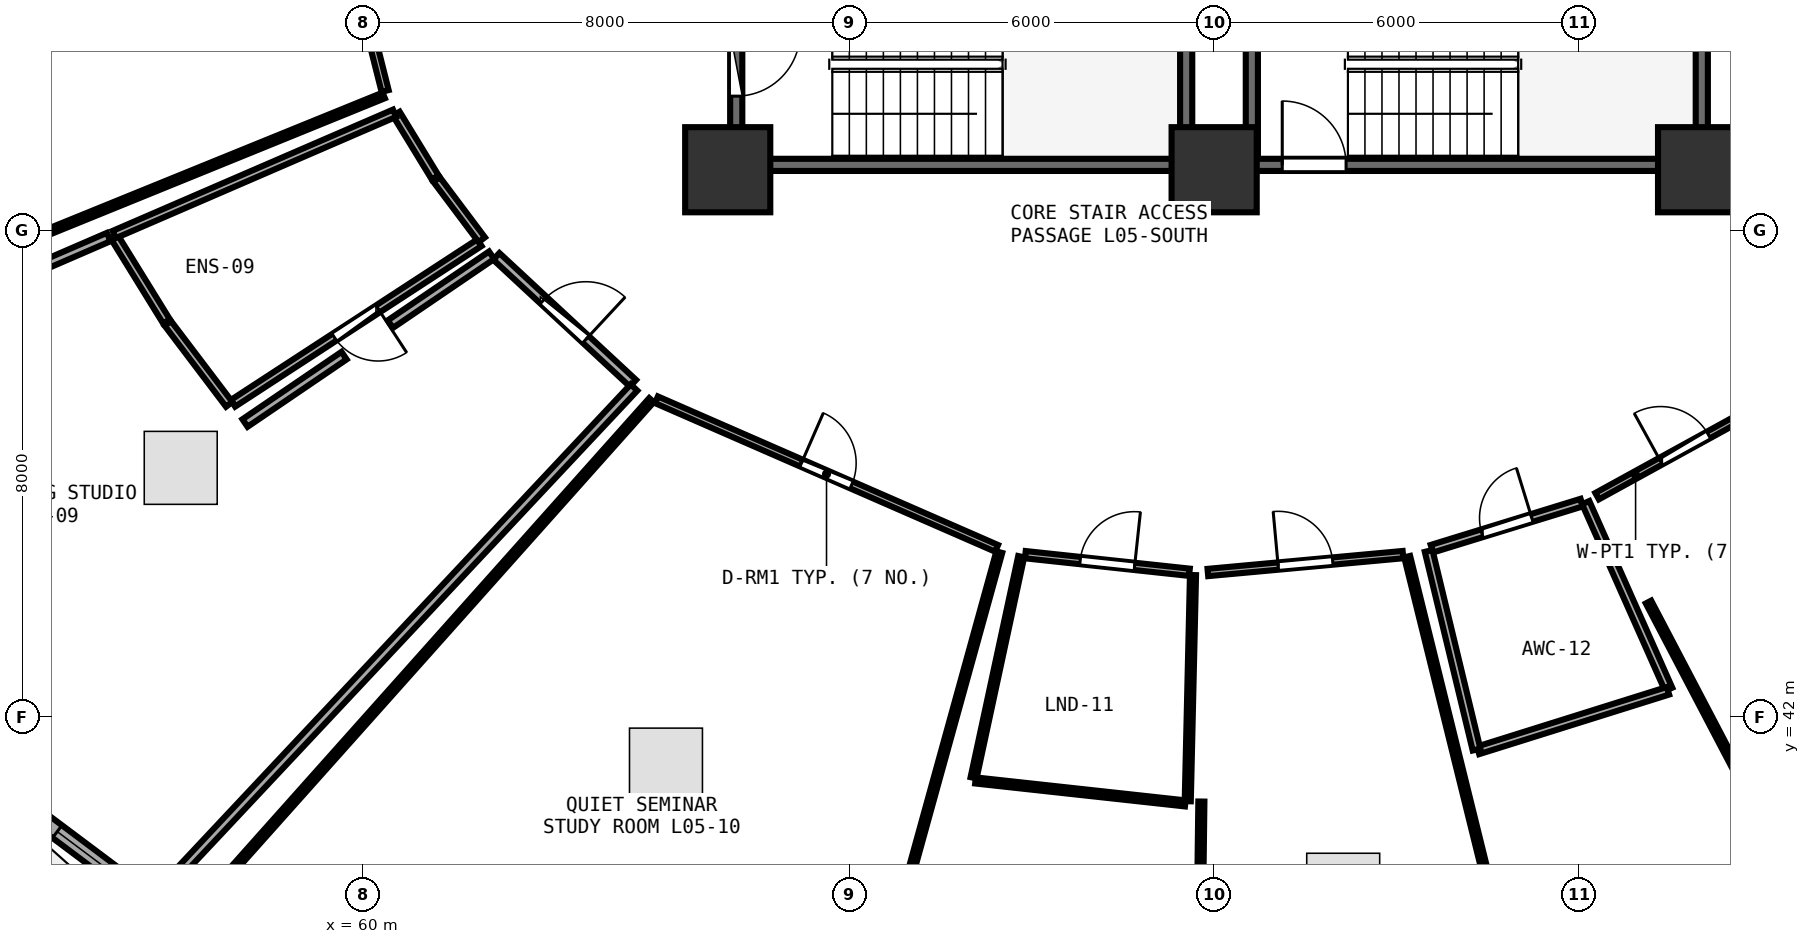
"""IFC4 building model, lengths in metres.
Left out: names, types, materials, properties, quantities, classifications, styles, units other than length and angle.
Written with IfcOpenShell. Run it as: python <this file> out.ifc"""

import sys

from ifc_helpers import new_model, si_unit, direction, frame, frame_2d, origin, origin_2d, place, context, subcontext, project, spatial, rectangle, extrude, element, fill, save


model = new_model("IFC4")
c1 = context("Model", 3, precision=1e-05, world=origin(), true_north=direction((0.0, 1.0)))
c2 = subcontext(c1, "Body", "Model", "MODEL_VIEW")
j1 = project(units=[si_unit("LENGTHUNIT", "METRE"), si_unit("PLANEANGLEUNIT", "RADIAN")], contexts=[c1])
p1 = place(None, origin())
s1 = spatial("IfcSite", under=j1, at=p1, CompositionType="ELEMENT")
p2 = place(p1, origin())
s2 = spatial("IfcBuilding", under=s1, at=p2, CompositionType="ELEMENT")
p3 = place(p2, frame((0.0, 0.0, 22.5)))
s3 = spatial("IfcBuildingStorey", under=s2, at=p3, CompositionType="ELEMENT", Elevation=22.5)
for number, where, z_axis, x_axis in (
    (1, (66.0, 51.0, 0.0), (0.0, 0.0, 1.0), (1.0, 0.0, 0.0)),
    (2, (74.0, 51.0, 0.0), (0.0, 0.0, 1.0), (1.0, 0.0, 0.0)),
    (3, (82.0, 51.0, 0.0), (0.0, 0.0, 1.0), (1.0, 0.0, 0.0)),
):
    element("IfcColumn", number, at=place(p3, frame(where, z_axis=z_axis, x_axis=x_axis)), inside=s3, PredefinedType="PILASTER", context=c2, shape_type="SweptSolid", body=[
        extrude(rectangle(XDim=1.4, YDim=1.4, at=origin_2d()), origin(), (0.0, 0.0, 1.0), 3.75),
    ])
p4 = place(p3, frame((53.016, 41.582, 0.0), z_axis=(0.0, 0.0, 1.0), x_axis=(0.80030733173, -0.599590005569, 0.0)))
e4 = element("IfcWall", 4, at=p4, inside=s3, PredefinedType="SOLIDWALL", context=c2, shape_type="SweptSolid", body=[
    extrude(rectangle(XDim=8.291, YDim=0.26, at=frame_2d((4.145, 0.0))), origin(), (0.0, 0.0, 1.0), 3.475),
])
p5 = place(p4, frame((2.445, 0.0, 0.85)))
e5 = element("IfcOpeningElement", 5, at=p5, cuts=e4, PredefinedType="OPENING", context=c2, shape_type="SweptSolid", body=[
    extrude(rectangle(XDim=1.6, YDim=1.45, at=frame_2d((0.8, 0.725))), frame((0.0, 0.14, 0.0), z_axis=(0.0, -1.0, 0.0), x_axis=(1.0, 0.0, 0.0)), (0.0, 0.0, 1.0), 0.28),
])
p6 = place(p3, frame((74.0, 51.08, 0.0), z_axis=(0.0, 0.0, 1.0), x_axis=(1.0, 0.0, 0.0)))
e6 = element("IfcWall", 6, at=p6, inside=s3, PredefinedType="SHEAR", context=c2, shape_type="SweptSolid", body=[
    extrude(rectangle(XDim=7.9, YDim=0.2, at=frame_2d((3.95, 0.0))), origin(), (0.0, 0.0, 1.0), 3.49),
])
p7 = place(p6, frame((1.12, 0.0, 0.0)))
e7 = element("IfcOpeningElement", 7, at=p7, cuts=e6, PredefinedType="OPENING", context=c2, shape_type="SweptSolid", body=[
    extrude(rectangle(XDim=1.05, YDim=2.1, at=frame_2d((0.525, 1.05))), frame((0.0, 0.11, 0.0), z_axis=(0.0, -1.0, 0.0), x_axis=(1.0, 0.0, 0.0)), (0.0, 0.0, 1.0), 0.22),
])
for number, where, z_axis, x_axis in (
    (8, (82.02, 51.2, 0.0), (0.0, 0.0, 1.0), (0.0, 1.0, 0.0)),
    (9, (74.62, 54.27, 0.0), (0.0, 0.0, 1.0), (0.0, -1.0, 0.0)),
):
    element("IfcWall", number, at=place(p3, frame(where, z_axis=z_axis, x_axis=x_axis)), inside=s3, PredefinedType="SHEAR", context=c2, shape_type="SweptSolid", body=[
        extrude(rectangle(XDim=3.07, YDim=0.2, at=frame_2d((1.535, 0.0))), origin(), (0.0, 0.0, 1.0), 3.49),
    ])
p8 = place(p3, frame((66.26, 51.08, 0.0), z_axis=(0.0, 0.0, 1.0), x_axis=(1.0, 0.0, 0.0)))
e10 = element("IfcWall", 10, at=p8, inside=s3, PredefinedType="SHEAR", context=c2, shape_type="SweptSolid", body=[
    extrude(rectangle(XDim=7.16, YDim=0.2, at=frame_2d((3.58, 0.0))), origin(), (0.0, 0.0, 1.0), 3.49),
])
p9 = place(p3, frame((73.54, 51.2, 0.0), z_axis=(0.0, 0.0, 1.0), x_axis=(0.0, 1.0, 0.0)))
e11 = element("IfcWall", 11, at=p9, inside=s3, PredefinedType="SHEAR", context=c2, shape_type="SweptSolid", body=[
    extrude(rectangle(XDim=3.07, YDim=0.2, at=frame_2d((1.535, 0.0))), origin(), (0.0, 0.0, 1.0), 3.49),
])
p10 = place(p3, frame((66.14, 54.27, 0.0), z_axis=(0.0, 0.0, 1.0), x_axis=(0.0, -1.0, 0.0)))
e12 = element("IfcWall", 12, at=p10, inside=s3, PredefinedType="SHEAR", context=c2, shape_type="SweptSolid", body=[
    extrude(rectangle(XDim=3.07, YDim=0.2, at=frame_2d((1.535, 0.0))), origin(), (0.0, 0.0, 1.0), 3.49),
])
p11 = place(p10, frame((1.01, 0.0, 0.0)))
e13 = element("IfcOpeningElement", 13, at=p11, cuts=e12, PredefinedType="OPENING", context=c2, shape_type="SweptSolid", body=[
    extrude(rectangle(XDim=1.05, YDim=2.1, at=frame_2d((0.525, 1.05))), frame((0.0, 0.11, 0.0), z_axis=(0.0, -1.0, 0.0), x_axis=(1.0, 0.0, 0.0)), (0.0, 0.0, 1.0), 0.22),
])
p12 = place(p3, frame((58.986, 57.775, 0.0), z_axis=(0.0, 0.0, 1.0), x_axis=(0.244192294026, -0.969726829338, 0.0)))
e14 = element("IfcWall", 14, at=p12, inside=s3, PredefinedType="PARTITIONING", context=c2, shape_type="SweptSolid", body=[
    extrude(rectangle(XDim=5.651, YDim=0.12, at=frame_2d((2.825, 0.0))), origin(), (0.0, 0.0, 1.0), 3.48),
])
p13 = place(p12, frame((2.375, 0.0, 0.0)))
e15 = element("IfcOpeningElement", 15, at=p13, cuts=e14, PredefinedType="OPENING", context=c2, shape_type="SweptSolid", body=[
    extrude(rectangle(XDim=0.9, YDim=2.08, at=frame_2d((0.45, 1.04))), frame((0.0, 0.07, 0.0), z_axis=(0.0, -1.0, 0.0), x_axis=(1.0, 0.0, 0.0)), (0.0, 0.0, 1.0), 0.14),
])
p14 = place(p3, frame((61.917, 49.8, 0.0), z_axis=(0.0, 0.0, 1.0), x_axis=(-0.837796261941, -0.545982988267, 0.0)))
e16 = element("IfcWall", 16, at=p14, inside=s3, PredefinedType="PLUMBINGWALL", context=c2, shape_type="SweptSolid", body=[
    extrude(rectangle(XDim=4.838, YDim=0.13, at=frame_2d((2.419, 0.0))), origin(), (0.0, 0.0, 1.0), 3.235),
])
p15 = place(p14, frame((1.989, 0.0, 0.0)))
e17 = element("IfcOpeningElement", 17, at=p15, cuts=e16, PredefinedType="OPENING", context=c2, shape_type="SweptSolid", body=[
    extrude(rectangle(XDim=0.86, YDim=2.05, at=frame_2d((0.43, 1.025))), frame((0.0, 0.075, 0.0), z_axis=(0.0, -1.0, 0.0), x_axis=(1.0, 0.0, 0.0)), (0.0, 0.0, 1.0), 0.15),
])
p16 = place(p3, frame((62.194, 49.575, 0.0), z_axis=(0.0, 0.0, 1.0), x_axis=(0.7329267348, -0.680307578538, 0.0)))
e18 = element("IfcWall", 18, at=p16, inside=s3, PredefinedType="PARTITIONING", context=c2, shape_type="SweptSolid", body=[
    extrude(rectangle(XDim=3.067, YDim=0.15, at=frame_2d((1.533, 0.0))), origin(), (0.0, 0.0, 1.0), 2.875),
])
p17 = place(p16, frame((1.059, 0.0, 0.0)))
e19 = element("IfcOpeningElement", 19, at=p17, cuts=e18, PredefinedType="OPENING", context=c2, shape_type="SweptSolid", body=[
    extrude(rectangle(XDim=0.95, YDim=2.08, at=frame_2d((0.475, 1.04))), frame((0.0, 0.085, 0.0), z_axis=(0.0, -1.0, 0.0), x_axis=(1.0, 0.0, 0.0)), (0.0, 0.0, 1.0), 0.17),
])
p18 = place(p3, frame((64.828, 47.217, 0.0), z_axis=(0.0, 0.0, 1.0), x_axis=(0.916419655578, -0.400218708797, 0.0)))
e20 = element("IfcWall", 20, at=p18, inside=s3, PredefinedType="PARTITIONING", context=c2, shape_type="SweptSolid", body=[
    extrude(rectangle(XDim=6.104, YDim=0.12, at=frame_2d((3.052, 0.0))), origin(), (0.0, 0.0, 1.0), 2.875),
])
p19 = place(p18, frame((2.602, 0.0, 0.0)))
e21 = element("IfcOpeningElement", 21, at=p19, cuts=e20, PredefinedType="OPENING", context=c2, shape_type="SweptSolid", body=[
    extrude(rectangle(XDim=0.9, YDim=2.08, at=frame_2d((0.45, 1.04))), frame((0.0, 0.07, 0.0), z_axis=(0.0, -1.0, 0.0), x_axis=(1.0, 0.0, 0.0)), (0.0, 0.0, 1.0), 0.14),
])
p20 = place(p3, frame((70.895, 44.67, 0.0), z_axis=(0.0, 0.0, 1.0), x_axis=(0.994302004983, -0.106599825921, 0.0)))
e22 = element("IfcWall", 22, at=p20, inside=s3, PredefinedType="PARTITIONING", context=c2, shape_type="SweptSolid", body=[
    extrude(rectangle(XDim=2.714, YDim=0.12, at=frame_2d((1.357, 0.0))), origin(), (0.0, 0.0, 1.0), 3.235),
])
p21 = place(p20, frame((0.907, 0.0, 0.0)))
e23 = element("IfcOpeningElement", 23, at=p21, cuts=e22, PredefinedType="OPENING", context=c2, shape_type="SweptSolid", body=[
    extrude(rectangle(XDim=0.9, YDim=2.08, at=frame_2d((0.45, 1.04))), frame((0.0, 0.07, 0.0), z_axis=(0.0, -1.0, 0.0), x_axis=(1.0, 0.0, 0.0)), (0.0, 0.0, 1.0), 0.14),
])
p22 = place(p3, frame((73.897, 44.376, 0.0), z_axis=(0.0, 0.0, 1.0), x_axis=(0.995829610124, 0.091232601628, 0.0)))
e24 = element("IfcWall", 24, at=p22, inside=s3, PredefinedType="PARTITIONING", context=c2, shape_type="SweptSolid", body=[
    extrude(rectangle(XDim=3.222, YDim=0.12, at=frame_2d((1.611, 0.0))), origin(), (0.0, 0.0, 1.0), 3.235),
])
p23 = place(p22, frame((1.161, 0.0, 0.0)))
e25 = element("IfcOpeningElement", 25, at=p23, cuts=e24, PredefinedType="OPENING", context=c2, shape_type="SweptSolid", body=[
    extrude(rectangle(XDim=0.9, YDim=2.08, at=frame_2d((0.45, 1.04))), frame((0.0, 0.07, 0.0), z_axis=(0.0, -1.0, 0.0), x_axis=(1.0, 0.0, 0.0)), (0.0, 0.0, 1.0), 0.14),
])
p24 = place(p3, frame((77.58, 44.768, 0.0), z_axis=(0.0, 0.0, 1.0), x_axis=(0.955754448098, 0.294165659011, 0.0)))
e26 = element("IfcWall", 26, at=p24, inside=s3, PredefinedType="PLUMBINGWALL", context=c2, shape_type="SweptSolid", body=[
    extrude(rectangle(XDim=2.579, YDim=0.13, at=frame_2d((1.29, 0.0))), origin(), (0.0, 0.0, 1.0), 3.235),
])
p25 = place(p24, frame((0.86, 0.0, 0.0)))
e27 = element("IfcOpeningElement", 27, at=p25, cuts=e26, PredefinedType="OPENING", context=c2, shape_type="SweptSolid", body=[
    extrude(rectangle(XDim=0.86, YDim=2.05, at=frame_2d((0.43, 1.025))), frame((0.0, 0.075, 0.0), z_axis=(0.0, -1.0, 0.0), x_axis=(1.0, 0.0, 0.0)), (0.0, 0.0, 1.0), 0.15),
])
p26 = place(p3, frame((80.299, 45.632, 0.0), z_axis=(0.0, 0.0, 1.0), x_axis=(0.876387079092, 0.481607399861, 0.0)))
e28 = element("IfcWall", 28, at=p26, inside=s3, PredefinedType="PARTITIONING", context=c2, shape_type="SweptSolid", body=[
    extrude(rectangle(XDim=3.281, YDim=0.12, at=frame_2d((1.641, 0.0))), origin(), (0.0, 0.0, 1.0), 2.875),
])
p27 = place(p26, frame((1.191, 0.0, 0.0)))
e29 = element("IfcOpeningElement", 29, at=p27, cuts=e28, PredefinedType="OPENING", context=c2, shape_type="SweptSolid", body=[
    extrude(rectangle(XDim=0.9, YDim=2.08, at=frame_2d((0.45, 1.04))), frame((0.0, 0.07, 0.0), z_axis=(0.0, -1.0, 0.0), x_axis=(1.0, 0.0, 0.0)), (0.0, 0.0, 1.0), 0.14),
])
p28 = place(p3, frame((60.343, 52.222, 0.0), z_axis=(0.0, 0.0, 1.0), x_axis=(-0.926333713065, -0.376703931542, 0.0)))
e30 = element("IfcWall", 30, at=p28, inside=s3, PredefinedType="PARTITIONING", context=c2, shape_type="SweptSolid", body=[
    extrude(rectangle(XDim=12.099, YDim=0.1, at=frame_2d((6.05, 0.0))), origin(), (0.0, 0.0, 1.0), 2.875),
])
p29 = place(p3, frame((60.549, 51.92, 0.0), z_axis=(0.0, 0.0, 1.0), x_axis=(0.52146609248, -0.853272004928, 0.0)))
e31 = element("IfcWall", 31, at=p29, inside=s3, PredefinedType="PLUMBINGWALL", context=c2, shape_type="SweptSolid", body=[
    extrude(rectangle(XDim=1.228, YDim=0.13, at=frame_2d((0.614, 0.0))), origin(), (0.0, 0.0, 1.0), 3.48),
])
p30 = place(p3, frame((61.212, 50.839, 0.0), z_axis=(0.0, 0.0, 1.0), x_axis=(0.600347056143, -0.79973959023, 0.0)))
e32 = element("IfcWall", 32, at=p30, inside=s3, PredefinedType="PLUMBINGWALL", context=c2, shape_type="SweptSolid", body=[
    extrude(rectangle(XDim=1.238, YDim=0.13, at=frame_2d((0.619, 0.0))), origin(), (0.0, 0.0, 1.0), 2.875),
])
p31 = place(p3, frame((57.801, 47.142, 0.0), z_axis=(0.0, 0.0, 1.0), x_axis=(-0.60376191721, 0.797164692725, 0.0)))
e33 = element("IfcWall", 33, at=p31, inside=s3, PredefinedType="PLUMBINGWALL", context=c2, shape_type="SweptSolid", body=[
    extrude(rectangle(XDim=1.669, YDim=0.13, at=frame_2d((0.834, 0.0))), origin(), (0.0, 0.0, 1.0), 3.175),
])
p32 = place(p3, frame((56.771, 48.505, 0.0), z_axis=(0.0, 0.0, 1.0), x_axis=(-0.525540089642, 0.850768837099, 0.0)))
e34 = element("IfcWall", 34, at=p32, inside=s3, PredefinedType="PLUMBINGWALL", context=c2, shape_type="SweptSolid", body=[
    extrude(rectangle(XDim=1.651, YDim=0.13, at=frame_2d((0.826, 0.0))), origin(), (0.0, 0.0, 1.0), 3.175),
])
p33 = place(p3, frame((55.91, 49.935, 0.0), z_axis=(0.0, 0.0, 1.0), x_axis=(0.917797204715, 0.397049481826, 0.0)))
e35 = element("IfcWall", 35, at=p33, inside=s3, PredefinedType="PLUMBINGWALL", context=c2, shape_type="SweptSolid", body=[
    extrude(rectangle(XDim=5.023, YDim=0.13, at=frame_2d((2.511, 0.0))), origin(), (0.0, 0.0, 1.0), 2.875),
])
p34 = place(p3, frame((64.458, 47.419, 0.0), z_axis=(0.0, 0.0, 1.0), x_axis=(-0.684261294523, -0.729236916796, 0.0)))
e36 = element("IfcWall", 36, at=p34, inside=s3, PredefinedType="PARTITIONING", context=c2, shape_type="SweptSolid", body=[
    extrude(rectangle(XDim=11.438, YDim=0.15, at=frame_2d((5.719, 0.0))), origin(), (0.0, 0.0, 1.0), 2.875),
])
p35 = place(p3, frame((49.426, 47.126, 0.0), z_axis=(0.0, 0.0, 1.0), x_axis=(0.917736225937, 0.397190407239, 0.0)))
e37 = element("IfcWall", 37, at=p35, inside=s3, PredefinedType="PARTITIONING", context=c2, shape_type="SweptSolid", body=[
    extrude(rectangle(XDim=6.967, YDim=0.15, at=frame_2d((3.483, 0.0))), origin(), (0.0, 0.0, 1.0), 2.875),
])
p36 = place(p3, frame((58.061, 46.834, 0.0), z_axis=(0.0, 0.0, 1.0), x_axis=(0.826811291248, 0.562479411769, 0.0)))
e38 = element("IfcWall", 38, at=p36, inside=s3, PredefinedType="PARTITIONING", context=c2, shape_type="SweptSolid", body=[
    extrude(rectangle(XDim=1.971, YDim=0.15, at=frame_2d((0.985, 0.0))), origin(), (0.0, 0.0, 1.0), 3.48),
])
p37 = place(p3, frame((60.451, 48.461, 0.0), z_axis=(0.0, 0.0, 1.0), x_axis=(0.826867883695, 0.562396215237, 0.0)))
e39 = element("IfcWall", 39, at=p37, inside=s3, PredefinedType="PARTITIONING", context=c2, shape_type="SweptSolid", body=[
    extrude(rectangle(XDim=2.014, YDim=0.15, at=frame_2d((1.007, 0.0))), origin(), (0.0, 0.0, 1.0), 3.235),
])
p38 = place(p3, frame((70.466, 44.711, 0.0), z_axis=(0.0, 0.0, 1.0), x_axis=(-0.26671307518, -0.963775977875, 0.0)))
e40 = element("IfcWall", 40, at=p38, inside=s3, PredefinedType="PARTITIONING", context=c2, shape_type="SweptSolid", body=[
    extrude(rectangle(XDim=10.865, YDim=0.1, at=frame_2d((5.432, 0.0))), origin(), (0.0, 0.0, 1.0), 2.875),
])
p39 = place(p3, frame((57.156, 38.706, 0.0), z_axis=(0.0, 0.0, 1.0), x_axis=(0.66580890104, 0.746122313897, 0.0)))
e41 = element("IfcWall", 41, at=p39, inside=s3, PredefinedType="PARTITIONING", context=c2, shape_type="SweptSolid", body=[
    extrude(rectangle(XDim=11.399, YDim=0.1, at=frame_2d((5.7, 0.0))), origin(), (0.0, 0.0, 1.0), 2.875),
])
p40 = place(p3, frame((73.652, 44.334, 0.0), z_axis=(0.0, 0.0, 1.0), x_axis=(-0.02316715399, -0.99973160547, 0.0)))
e42 = element("IfcWall", 42, at=p40, inside=s3, PredefinedType="PARTITIONING", context=c2, shape_type="SweptSolid", body=[
    extrude(rectangle(XDim=3.72, YDim=0.1, at=frame_2d((1.86, 0.0))), origin(), (0.0, 0.0, 1.0), 3.175),
])
p41 = place(p3, frame((73.525, 40.579, 0.0), z_axis=(0.0, 0.0, 1.0), x_axis=(-0.994070147468, 0.108740709544, 0.0)))
e43 = element("IfcWall", 43, at=p41, inside=s3, PredefinedType="PARTITIONING", context=c2, shape_type="SweptSolid", body=[
    extrude(rectangle(XDim=3.471, YDim=0.1, at=frame_2d((1.735, 0.0))), origin(), (0.0, 0.0, 1.0), 3.175),
])
p42 = place(p3, frame((70.043, 41.0, 0.0), z_axis=(0.0, 0.0, 1.0), x_axis=(0.210519412271, 0.977589677246, 0.0)))
e44 = element("IfcWall", 44, at=p42, inside=s3, PredefinedType="PARTITIONING", context=c2, shape_type="SweptSolid", body=[
    extrude(rectangle(XDim=3.72, YDim=0.1, at=frame_2d((1.86, 0.0))), origin(), (0.0, 0.0, 1.0), 3.175),
])
p43 = place(p3, frame((77.175, 44.637, 0.0), z_axis=(0.0, 0.0, 1.0), x_axis=(0.239971369295, -0.970779965759, 0.0)))
e45 = element("IfcWall", 45, at=p43, inside=s3, PredefinedType="PARTITIONING", context=c2, shape_type="SweptSolid", body=[
    extrude(rectangle(XDim=10.846, YDim=0.1, at=frame_2d((5.423, 0.0))), origin(), (0.0, 0.0, 1.0), 2.875),
])
p44 = place(p3, frame((73.701, 33.561, 0.0), z_axis=(0.0, 0.0, 1.0), x_axis=(0.012537113793, 0.9999214073, 0.0)))
e46 = element("IfcWall", 46, at=p44, inside=s3, PredefinedType="PARTITIONING", context=c2, shape_type="SweptSolid", body=[
    extrude(rectangle(XDim=7.049, YDim=0.1, at=frame_2d((3.525, 0.0))), origin(), (0.0, 0.0, 1.0), 2.875),
])
p45 = place(p3, frame((80.111, 45.526, 0.0), z_axis=(0.0, 0.0, 1.0), x_axis=(0.405936178007, -0.913901427608, 0.0)))
e47 = element("IfcWall", 47, at=p45, inside=s3, PredefinedType="PLUMBINGWALL", context=c2, shape_type="SweptSolid", body=[
    extrude(rectangle(XDim=3.36, YDim=0.13, at=frame_2d((1.68, 0.0))), origin(), (0.0, 0.0, 1.0), 2.875),
])
p46 = place(p3, frame((81.464, 42.431, 0.0), z_axis=(0.0, 0.0, 1.0), x_axis=(-0.954175708416, -0.299246917226, 0.0)))
e48 = element("IfcWall", 48, at=p46, inside=s3, PredefinedType="PLUMBINGWALL", context=c2, shape_type="SweptSolid", body=[
    extrude(rectangle(XDim=3.275, YDim=0.13, at=frame_2d((1.637, 0.0))), origin(), (0.0, 0.0, 1.0), 2.875),
])
p47 = place(p3, frame((78.315, 41.464, 0.0), z_axis=(0.0, 0.0, 1.0), x_axis=(-0.234406131581, 0.972138758345, 0.0)))
e49 = element("IfcWall", 49, at=p47, inside=s3, PredefinedType="PLUMBINGWALL", context=c2, shape_type="SweptSolid", body=[
    extrude(rectangle(XDim=3.36, YDim=0.13, at=frame_2d((1.68, 0.0))), origin(), (0.0, 0.0, 1.0), 3.235),
])
p48 = place(p3, frame((85.401, 35.769, 0.0), z_axis=(0.0, 0.0, 1.0), x_axis=(-0.464308397246, 0.885673592384, 0.0)))
e50 = element("IfcWall", 50, at=p48, inside=s3, PredefinedType="PARTITIONING", context=c2, shape_type="SweptSolid", body=[
    extrude(rectangle(XDim=9.17, YDim=0.1, at=frame_2d((4.585, 0.0))), origin(), (0.0, 0.0, 1.0), 2.875),
])
p49 = place(p5, origin())
e51 = element("IfcWindow", 51, at=p49, inside=s3, PartitioningType="SINGLE_PANEL", PredefinedType="WINDOW", context=c2, shape_type="SweptSolid", body=[
    extrude(rectangle(XDim=1.6, YDim=1.45, at=frame_2d((0.8, 0.725))), frame((0.0, 0.03, 0.0), z_axis=(0.0, -1.0, 0.0), x_axis=(1.0, 0.0, 0.0)), (0.0, 0.0, 1.0), 0.06),
])
fill(e5, e51)
p50 = place(p7, origin())
e52 = element("IfcDoor", 52, at=p50, inside=s3, OperationType="SINGLE_SWING_LEFT", PredefinedType="DOOR", context=c2, shape_type="SweptSolid", body=[
    extrude(rectangle(XDim=1.05, YDim=2.1, at=frame_2d((0.525, 1.05))), frame((0.0, 0.025, 0.0), z_axis=(0.0, -1.0, 0.0), x_axis=(1.0, 0.0, 0.0)), (0.0, 0.0, 1.0), 0.05),
])
fill(e7, e52)
p51 = place(p11, origin())
e53 = element("IfcDoor", 53, at=p51, inside=s3, OperationType="SINGLE_SWING_LEFT", PredefinedType="DOOR", context=c2, shape_type="SweptSolid", body=[
    extrude(rectangle(XDim=1.05, YDim=2.1, at=frame_2d((0.525, 1.05))), frame((0.0, 0.025, 0.0), z_axis=(0.0, -1.0, 0.0), x_axis=(1.0, 0.0, 0.0)), (0.0, 0.0, 1.0), 0.05),
])
fill(e13, e53)
p52 = place(p15, origin())
e54 = element("IfcDoor", 54, at=p52, inside=s3, OperationType="SINGLE_SWING_LEFT", PredefinedType="DOOR", context=c2, shape_type="SweptSolid", body=[
    extrude(rectangle(XDim=0.86, YDim=2.05, at=frame_2d((0.43, 1.025))), frame((0.0, 0.025, 0.0), z_axis=(0.0, -1.0, 0.0), x_axis=(1.0, 0.0, 0.0)), (0.0, 0.0, 1.0), 0.05),
])
fill(e17, e54)
p53 = place(p17, origin())
e55 = element("IfcDoor", 55, at=p53, inside=s3, OperationType="SINGLE_SWING_RIGHT", PredefinedType="DOOR", context=c2, shape_type="SweptSolid", body=[
    extrude(rectangle(XDim=0.95, YDim=2.08, at=frame_2d((0.475, 1.04))), frame((0.0, 0.025, 0.0), z_axis=(0.0, -1.0, 0.0), x_axis=(1.0, 0.0, 0.0)), (0.0, 0.0, 1.0), 0.05),
])
fill(e19, e55)
p54 = place(p19, origin())
e56 = element("IfcDoor", 56, at=p54, inside=s3, OperationType="SINGLE_SWING_LEFT", PredefinedType="DOOR", context=c2, shape_type="SweptSolid", body=[
    extrude(rectangle(XDim=0.9, YDim=2.08, at=frame_2d((0.45, 1.04))), frame((0.0, 0.025, 0.0), z_axis=(0.0, -1.0, 0.0), x_axis=(1.0, 0.0, 0.0)), (0.0, 0.0, 1.0), 0.05),
])
fill(e21, e56)
p55 = place(p21, origin())
e57 = element("IfcDoor", 57, at=p55, inside=s3, OperationType="SINGLE_SWING_RIGHT", PredefinedType="DOOR", context=c2, shape_type="SweptSolid", body=[
    extrude(rectangle(XDim=0.9, YDim=2.08, at=frame_2d((0.45, 1.04))), frame((0.0, 0.025, 0.0), z_axis=(0.0, -1.0, 0.0), x_axis=(1.0, 0.0, 0.0)), (0.0, 0.0, 1.0), 0.05),
])
fill(e23, e57)
p56 = place(p23, origin())
e58 = element("IfcDoor", 58, at=p56, inside=s3, OperationType="SINGLE_SWING_LEFT", PredefinedType="DOOR", context=c2, shape_type="SweptSolid", body=[
    extrude(rectangle(XDim=0.9, YDim=2.08, at=frame_2d((0.45, 1.04))), frame((0.0, 0.025, 0.0), z_axis=(0.0, -1.0, 0.0), x_axis=(1.0, 0.0, 0.0)), (0.0, 0.0, 1.0), 0.05),
])
fill(e25, e58)
p57 = place(p25, origin())
e59 = element("IfcDoor", 59, at=p57, inside=s3, OperationType="SINGLE_SWING_RIGHT", PredefinedType="DOOR", context=c2, shape_type="SweptSolid", body=[
    extrude(rectangle(XDim=0.86, YDim=2.05, at=frame_2d((0.43, 1.025))), frame((0.0, 0.025, 0.0), z_axis=(0.0, -1.0, 0.0), x_axis=(1.0, 0.0, 0.0)), (0.0, 0.0, 1.0), 0.05),
])
fill(e27, e59)
p58 = place(p27, origin())
e60 = element("IfcDoor", 60, at=p58, inside=s3, OperationType="SINGLE_SWING_LEFT", PredefinedType="DOOR", context=c2, shape_type="SweptSolid", body=[
    extrude(rectangle(XDim=0.9, YDim=2.08, at=frame_2d((0.45, 1.04))), frame((0.0, 0.025, 0.0), z_axis=(0.0, -1.0, 0.0), x_axis=(1.0, 0.0, 0.0)), (0.0, 0.0, 1.0), 0.05),
])
fill(e29, e60)
save(model, sys.argv[1])
